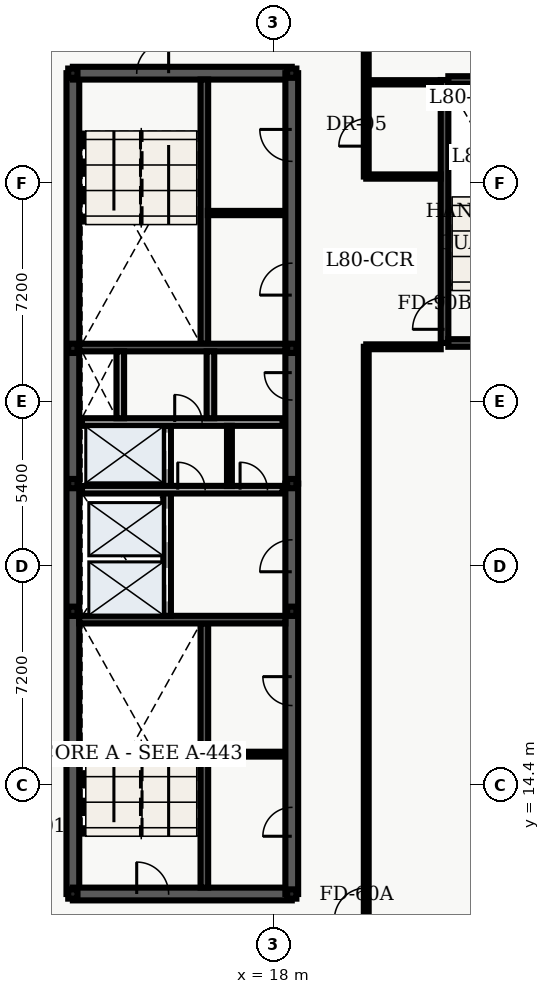
"""IFC4 building model, lengths in metres.
Left out: names, types, materials, properties, quantities, classifications, styles, units other than length and angle.
Written with IfcOpenShell. Run it as: python <this file> out.ifc"""

import sys

from ifc_helpers import new_model, entity, si_unit, converted_unit, direction, frame, origin_with_axes, origin_2d_with_axis, place, context, subcontext, project, spatial, polyline, rectangle, hollow_rectangle, outline, extrude, element, fill, save


model = new_model("IFC4")
c1 = context("Model", 3, precision=1e-05, world=origin_with_axes(), true_north=direction((0.0, 1.0)))
c2 = subcontext(c1, "Body", "Model", "MODEL_VIEW")
j1 = project(units=[si_unit("LENGTHUNIT", "METRE"), converted_unit("PLANEANGLEUNIT", "DEGREE", entity("IfcPlaneAngleMeasure", 0.017), si_unit("PLANEANGLEUNIT", "RADIAN"), dimensions=[0, 0, 0, 0, 0, 0, 0])], contexts=[c1])
p1 = place(None, origin_with_axes())
s1 = spatial("IfcSite", under=j1, at=p1, CompositionType="ELEMENT")
p2 = place(p1, origin_with_axes())
s2 = spatial("IfcBuilding", under=s1, at=p2, CompositionType="ELEMENT")
p3 = place(p2, frame((0.0, 0.0, 324.3), z_axis=(0.0, 0.0, 1.0), x_axis=(1.0, 0.0, 0.0)))
s3 = spatial("IfcBuildingStorey", under=s2, at=p3, CompositionType="ELEMENT", Elevation=324.3)
p4 = place(p3, frame((11.4, 10.8, 0.0), z_axis=(0.0, 0.0, 1.0), x_axis=(0.0, 1.0, 0.0)))
e1 = element("IfcWall", 1, at=p4, inside=s3, PredefinedType="SHEAR", context=c2, shape_type="SweptSolid", body=[
    extrude(outline(polyline([(0.0, -0.21), (27.0, -0.21), (27.0, 0.21), (0.0, 0.21), (0.0, -0.21)])), origin_with_axes(), (0.0, 0.0, 1.0), 3.64),
])
p5 = place(p3, frame((11.4, 10.8, 0.0), z_axis=(0.0, 0.0, 1.0), x_axis=(1.0, 0.0, 0.0)))
e2 = element("IfcWall", 2, at=p5, inside=s3, PredefinedType="SHEAR", context=c2, shape_type="SweptSolid", body=[
    extrude(outline(polyline([(0.0, -0.21), (7.2, -0.21), (7.2, 0.21), (0.0, 0.21), (0.0, -0.21)])), origin_with_axes(), (0.0, 0.0, 1.0), 3.64),
])
p6 = place(p5, frame((2.625, 0.0, 0.0), z_axis=(0.0, 0.0, 1.0), x_axis=(1.0, 0.0, 0.0)))
e3 = element("IfcOpeningElement", 3, at=p6, cuts=e2, PredefinedType="OPENING", context=c2, shape_type="SweptSolid", body=[
    extrude(rectangle(XDim=1.05, YDim=0.44, at=origin_2d_with_axis()), origin_with_axes(), (0.0, 0.0, 1.0), 2.15),
])
p7 = place(p3, frame((11.4, 37.8, 0.0), z_axis=(0.0, 0.0, 1.0), x_axis=(1.0, 0.0, 0.0)))
e4 = element("IfcWall", 4, at=p7, inside=s3, PredefinedType="SHEAR", context=c2, shape_type="SweptSolid", body=[
    extrude(outline(polyline([(0.0, -0.21), (7.2, -0.21), (7.2, 0.21), (0.0, 0.21), (0.0, -0.21)])), origin_with_axes(), (0.0, 0.0, 1.0), 3.64),
])
p8 = place(p7, frame((2.625, 0.0, 0.0), z_axis=(0.0, 0.0, 1.0), x_axis=(1.0, 0.0, 0.0)))
e5 = element("IfcOpeningElement", 5, at=p8, cuts=e4, PredefinedType="OPENING", context=c2, shape_type="SweptSolid", body=[
    extrude(rectangle(XDim=1.05, YDim=0.44, at=origin_2d_with_axis()), origin_with_axes(), (0.0, 0.0, 1.0), 2.15),
])
p9 = place(p3, frame((18.6, 10.8, 0.0), z_axis=(0.0, 0.0, 1.0), x_axis=(0.0, 1.0, 0.0)))
e6 = element("IfcWall", 6, at=p9, inside=s3, PredefinedType="SHEAR", context=c2, shape_type="SweptSolid", body=[
    extrude(outline(polyline([(0.0, -0.21), (13.5, -0.21), (13.5, 0.21), (0.0, 0.21), (0.0, -0.21)])), origin_with_axes(), (0.0, 0.0, 1.0), 3.64),
])
p10 = place(p9, frame((11.125, 0.0, 0.0), z_axis=(0.0, 0.0, 1.0), x_axis=(1.0, 0.0, 0.0)))
e7 = element("IfcOpeningElement", 7, at=p10, cuts=e6, PredefinedType="OPENING", context=c2, shape_type="SweptSolid", body=[
    extrude(rectangle(XDim=1.05, YDim=0.44, at=origin_2d_with_axis()), origin_with_axes(), (0.0, 0.0, 1.0), 2.15),
])
p11 = place(p9, frame((2.375, 0.0, 0.0), z_axis=(0.0, 0.0, 1.0), x_axis=(1.0, 0.0, 0.0)))
e8 = element("IfcOpeningElement", 8, at=p11, cuts=e6, PredefinedType="OPENING", context=c2, shape_type="SweptSolid", body=[
    extrude(rectangle(XDim=0.95, YDim=0.44, at=origin_2d_with_axis()), origin_with_axes(), (0.0, 0.0, 1.0), 2.15),
])
p12 = place(p9, frame((6.675, 0.0, 0.0), z_axis=(0.0, 0.0, 1.0), x_axis=(1.0, 0.0, 0.0)))
e9 = element("IfcOpeningElement", 9, at=p12, cuts=e6, PredefinedType="OPENING", context=c2, shape_type="SweptSolid", body=[
    extrude(rectangle(XDim=0.95, YDim=0.44, at=origin_2d_with_axis()), origin_with_axes(), (0.0, 0.0, 1.0), 2.15),
])
p13 = place(p3, frame((18.6, 24.3, 0.0), z_axis=(0.0, 0.0, 1.0), x_axis=(0.0, 1.0, 0.0)))
e10 = element("IfcWall", 10, at=p13, inside=s3, PredefinedType="SHEAR", context=c2, shape_type="SweptSolid", body=[
    extrude(outline(polyline([(0.0, -0.21), (13.5, -0.21), (13.5, 0.21), (0.0, 0.21), (0.0, -0.21)])), origin_with_axes(), (0.0, 0.0, 1.0), 3.64),
])
p14 = place(p13, frame((3.2, 0.0, 0.0), z_axis=(0.0, 0.0, 1.0), x_axis=(1.0, 0.0, 0.0)))
e11 = element("IfcOpeningElement", 11, at=p14, cuts=e10, PredefinedType="OPENING", context=c2, shape_type="SweptSolid", body=[
    extrude(rectangle(XDim=0.9, YDim=0.44, at=origin_2d_with_axis()), origin_with_axes(), (0.0, 0.0, 1.0), 2.15),
])
p15 = place(p13, frame((6.725, 0.0, 0.0), z_axis=(0.0, 0.0, 1.0), x_axis=(1.0, 0.0, 0.0)))
e12 = element("IfcOpeningElement", 12, at=p15, cuts=e10, PredefinedType="OPENING", context=c2, shape_type="SweptSolid", body=[
    extrude(rectangle(XDim=1.05, YDim=0.44, at=origin_2d_with_axis()), origin_with_axes(), (0.0, 0.0, 1.0), 2.15),
])
p16 = place(p13, frame((11.125, 0.0, 0.0), z_axis=(0.0, 0.0, 1.0), x_axis=(1.0, 0.0, 0.0)))
e13 = element("IfcOpeningElement", 13, at=p16, cuts=e10, PredefinedType="OPENING", context=c2, shape_type="SweptSolid", body=[
    extrude(rectangle(XDim=1.05, YDim=0.44, at=origin_2d_with_axis()), origin_with_axes(), (0.0, 0.0, 1.0), 2.15),
])
p17 = place(p3, frame((15.725, 11.01, 0.0), z_axis=(0.0, 0.0, 1.0), x_axis=(0.0, 1.0, 0.0)))
e14 = element("IfcWall", 14, at=p17, inside=s3, PredefinedType="SHEAR", context=c2, shape_type="SweptSolid", body=[
    extrude(outline(polyline([(0.0, -0.125), (8.69, -0.125), (8.69, 0.125), (0.0, 0.125), (0.0, -0.125)])), origin_with_axes(), (0.0, 0.0, 1.0), 3.64),
])
p18 = place(p3, frame((11.61, 19.825, 0.0), z_axis=(0.0, 0.0, 1.0), x_axis=(1.0, 0.0, 0.0)))
e15 = element("IfcWall", 15, at=p18, inside=s3, PredefinedType="SHEAR", context=c2, shape_type="SweptSolid", body=[
    extrude(outline(polyline([(0.0, -0.125), (6.78, -0.125), (6.78, 0.125), (0.0, 0.125), (0.0, -0.125)])), origin_with_axes(), (0.0, 0.0, 1.0), 3.64),
])
p19 = place(p3, frame((15.725, 28.9, 0.0), z_axis=(0.0, 0.0, 1.0), x_axis=(0.0, 1.0, 0.0)))
e16 = element("IfcWall", 16, at=p19, inside=s3, PredefinedType="SHEAR", context=c2, shape_type="SweptSolid", body=[
    extrude(outline(polyline([(0.0, -0.125), (8.69, -0.125), (8.69, 0.125), (0.0, 0.125), (0.0, -0.125)])), origin_with_axes(), (0.0, 0.0, 1.0), 3.64),
])
p20 = place(p3, frame((11.61, 28.775, 0.0), z_axis=(0.0, 0.0, 1.0), x_axis=(1.0, 0.0, 0.0)))
e17 = element("IfcWall", 17, at=p20, inside=s3, PredefinedType="SHEAR", context=c2, shape_type="SweptSolid", body=[
    extrude(outline(polyline([(0.0, -0.125), (6.78, -0.125), (6.78, 0.125), (0.0, 0.125), (0.0, -0.125)])), origin_with_axes(), (0.0, 0.0, 1.0), 3.64),
])
p21 = place(p3, frame((14.5, 19.95, 0.0), z_axis=(0.0, 0.0, 1.0), x_axis=(0.0, 1.0, 0.0)))
e18 = element("IfcWall", 18, at=p21, inside=s3, PredefinedType="SOLIDWALL", context=c2, shape_type="SweptSolid", body=[
    extrude(outline(polyline([(0.0, -0.125), (6.25, -0.125), (6.25, 0.125), (0.0, 0.125), (0.0, -0.125)])), origin_with_axes(), (0.0, 0.0, 1.0), 2.68),
])
p22 = place(p21, frame((1.025, 0.0, 0.0), z_axis=(0.0, 0.0, 1.0), x_axis=(1.0, 0.0, 0.0)))
e19 = element("IfcOpeningElement", 19, at=p22, cuts=e18, PredefinedType="OPENING", context=c2, shape_type="SweptSolid", body=[
    extrude(rectangle(XDim=1.1, YDim=0.27, at=origin_2d_with_axis()), origin_with_axes(), (0.0, 0.0, 1.0), 2.15),
])
p23 = place(p21, frame((2.975, 0.0, 0.0), z_axis=(0.0, 0.0, 1.0), x_axis=(1.0, 0.0, 0.0)))
e20 = element("IfcOpeningElement", 20, at=p23, cuts=e18, PredefinedType="OPENING", context=c2, shape_type="SweptSolid", body=[
    extrude(rectangle(XDim=1.1, YDim=0.27, at=origin_2d_with_axis()), origin_with_axes(), (0.0, 0.0, 1.0), 2.15),
])
p24 = place(p21, frame((5.425, 0.0, 0.0), z_axis=(0.0, 0.0, 1.0), x_axis=(1.0, 0.0, 0.0)))
e21 = element("IfcOpeningElement", 21, at=p24, cuts=e18, PredefinedType="OPENING", context=c2, shape_type="SweptSolid", body=[
    extrude(rectangle(XDim=1.2, YDim=0.27, at=origin_2d_with_axis()), origin_with_axes(), (0.0, 0.0, 1.0), 2.15),
])
p25 = place(p3, frame((11.7, 24.1, 0.0), z_axis=(0.0, 0.0, 1.0), x_axis=(1.0, 0.0, 0.0)))
e22 = element("IfcWall", 22, at=p25, inside=s3, PredefinedType="SOLIDWALL", context=c2, shape_type="SweptSolid", body=[
    extrude(outline(polyline([(0.0, -0.125), (6.6, -0.125), (6.6, 0.125), (0.0, 0.125), (0.0, -0.125)])), origin_with_axes(), (0.0, 0.0, 1.0), 2.68),
])
p26 = place(p25, frame((3.6, 0.0, 0.0), z_axis=(0.0, 0.0, 1.0), x_axis=(1.0, 0.0, 0.0)))
e23 = element("IfcOpeningElement", 23, at=p26, cuts=e22, PredefinedType="OPENING", context=c2, shape_type="SweptSolid", body=[
    extrude(rectangle(XDim=0.9, YDim=0.27, at=origin_2d_with_axis()), origin_with_axes(), (0.0, 0.0, 1.0), 2.15),
])
p27 = place(p25, frame((5.65, 0.0, 0.0), z_axis=(0.0, 0.0, 1.0), x_axis=(1.0, 0.0, 0.0)))
e24 = element("IfcOpeningElement", 24, at=p27, cuts=e22, PredefinedType="OPENING", context=c2, shape_type="SweptSolid", body=[
    extrude(rectangle(XDim=0.9, YDim=0.27, at=origin_2d_with_axis()), origin_with_axes(), (0.0, 0.0, 1.0), 2.15),
])
p28 = place(p3, frame((11.7, 26.325, 0.0), z_axis=(0.0, 0.0, 1.0), x_axis=(1.0, 0.0, 0.0)))
e25 = element("IfcWall", 25, at=p28, inside=s3, PredefinedType="SOLIDWALL", context=c2, shape_type="SweptSolid", body=[
    extrude(outline(polyline([(0.0, -0.125), (6.6, -0.125), (6.6, 0.125), (0.0, 0.125), (0.0, -0.125)])), origin_with_axes(), (0.0, 0.0, 1.0), 2.68),
])
p29 = place(p28, frame((3.5, 0.0, 0.0), z_axis=(0.0, 0.0, 1.0), x_axis=(1.0, 0.0, 0.0)))
e26 = element("IfcOpeningElement", 26, at=p29, cuts=e25, PredefinedType="OPENING", context=c2, shape_type="SweptSolid", body=[
    extrude(rectangle(XDim=0.9, YDim=0.27, at=origin_2d_with_axis()), origin_with_axes(), (0.0, 0.0, 1.0), 2.15),
])
for number, where, z_axis, x_axis in (
    (27, (12.96, 26.45, 0.0), (0.0, 0.0, 1.0), (0.0, 1.0, 0.0)),
    (28, (15.925, 26.45, 0.0), (0.0, 0.0, 1.0), (0.0, 1.0, 0.0)),
):
    element("IfcWall", number, at=place(p3, frame(where, z_axis=z_axis, x_axis=x_axis)), inside=s3, PredefinedType="SOLIDWALL", context=c2, shape_type="SweptSolid", body=[
        extrude(outline(polyline([(0.0, -0.125), (2.2, -0.125), (2.2, 0.125), (0.0, 0.125), (0.0, -0.125)])), origin_with_axes(), (0.0, 0.0, 1.0), 2.68),
    ])
p30 = place(p3, frame((23.625, 28.925, 0.0), z_axis=(0.0, 0.0, 1.0), x_axis=(0.0, 1.0, 0.0)))
e29 = element("IfcWall", 29, at=p30, inside=s3, PredefinedType="SHEAR", context=c2, shape_type="SweptSolid", body=[
    extrude(outline(polyline([(0.0, -0.125), (8.65, -0.125), (8.65, 0.125), (0.0, 0.125), (0.0, -0.125)])), origin_with_axes(), (0.0, 0.0, 1.0), 3.64),
])
p31 = place(p30, frame((0.975, 0.0, 0.0), z_axis=(0.0, 0.0, 1.0), x_axis=(1.0, 0.0, 0.0)))
e30 = element("IfcOpeningElement", 30, at=p31, cuts=e29, PredefinedType="OPENING", context=c2, shape_type="SweptSolid", body=[
    extrude(rectangle(XDim=1.05, YDim=0.27, at=origin_2d_with_axis()), origin_with_axes(), (0.0, 0.0, 1.0), 2.15),
])
for number, where, z_axis, x_axis in (
    (31, (23.75, 28.925, 0.0), (0.0, 0.0, 1.0), (1.0, 0.0, 0.0)),
    (32, (23.75, 37.575, 0.0), (0.0, 0.0, 1.0), (1.0, 0.0, 0.0)),
):
    element("IfcWall", number, at=place(p3, frame(where, z_axis=z_axis, x_axis=x_axis)), inside=s3, PredefinedType="SHEAR", context=c2, shape_type="SweptSolid", body=[
        extrude(outline(polyline([(0.0, -0.125), (3.9, -0.125), (3.9, 0.125), (0.0, 0.125), (0.0, -0.125)])), origin_with_axes(), (0.0, 0.0, 1.0), 3.64),
    ])
for number, where, z_axis, x_axis in (
    (33, (11.4, 10.8, 0.0), (0.0, 0.0, 1.0), (1.0, 0.0, 0.0)),
    (34, (11.4, 20.1, 0.0), (0.0, 0.0, 1.0), (1.0, 0.0, 0.0)),
    (35, (11.4, 24.3, 0.0), (0.0, 0.0, 1.0), (1.0, 0.0, 0.0)),
    (36, (11.4, 28.75, 0.0), (0.0, 0.0, 1.0), (1.0, 0.0, 0.0)),
    (37, (11.4, 37.8, 0.0), (0.0, 0.0, 1.0), (1.0, 0.0, 0.0)),
    (38, (18.6, 10.8, 0.0), (0.0, 0.0, 1.0), (1.0, 0.0, 0.0)),
    (39, (18.6, 20.1, 0.0), (0.0, 0.0, 1.0), (1.0, 0.0, 0.0)),
    (40, (18.6, 24.3, 0.0), (0.0, 0.0, 1.0), (1.0, 0.0, 0.0)),
    (41, (18.6, 28.75, 0.0), (0.0, 0.0, 1.0), (1.0, 0.0, 0.0)),
    (42, (18.6, 37.8, 0.0), (0.0, 0.0, 1.0), (1.0, 0.0, 0.0)),
):
    element("IfcColumn", number, at=place(p3, frame(where, z_axis=z_axis, x_axis=x_axis)), inside=s3, PredefinedType="COLUMN", context=c2, shape_type="SweptSolid", body=[
        extrude(hollow_rectangle(XDim=0.305, YDim=0.305, WallThickness=0.015, InnerFilletRadius=0.015, OuterFilletRadius=0.03, at=origin_2d_with_axis()), origin_with_axes(), (0.0, 0.0, 1.0), 3.9),
    ])
p32 = place(p3, frame((16.55, 24.22, 0.0), z_axis=(0.0, 0.0, 1.0), x_axis=(0.0, 1.0, 0.0)))
e43 = element("IfcWall", 43, at=p32, inside=s3, PredefinedType="PARTITIONING", context=c2, shape_type="SweptSolid", body=[
    extrude(outline(polyline([(0.0, -0.08), (1.98, -0.08), (1.98, 0.08), (0.0, 0.08), (0.0, -0.08)])), origin_with_axes(), (0.0, 0.0, 1.0), 2.68),
])
p33 = place(p3, frame((15.84, 15.4, 0.0), z_axis=(0.0, 0.0, 1.0), x_axis=(1.0, 0.0, 0.0)))
e44 = element("IfcWall", 44, at=p33, inside=s3, PredefinedType="PARTITIONING", context=c2, shape_type="SweptSolid", body=[
    extrude(outline(polyline([(0.0, -0.08), (2.46, -0.08), (2.46, 0.08), (0.0, 0.08), (0.0, -0.08)])), origin_with_axes(), (0.0, 0.0, 1.0), 2.68),
])
p34 = place(p3, frame((15.84, 33.2, 0.0), z_axis=(0.0, 0.0, 1.0), x_axis=(1.0, 0.0, 0.0)))
e45 = element("IfcWall", 45, at=p34, inside=s3, PredefinedType="PARTITIONING", context=c2, shape_type="SweptSolid", body=[
    extrude(outline(polyline([(0.0, -0.07), (2.46, -0.07), (2.46, 0.07), (0.0, 0.07), (0.0, -0.07)])), origin_with_axes(), (0.0, 0.0, 1.0), 2.68),
])
for number, where, z_axis, x_axis in (
    (46, (21.05, 34.4, 0.0), (0.0, 0.0, 1.0), (1.0, 0.0, 0.0)),
    (47, (21.05, 37.5, 0.0), (0.0, 0.0, 1.0), (1.0, 0.0, 0.0)),
):
    element("IfcWall", number, at=place(p3, frame(where, z_axis=z_axis, x_axis=x_axis)), inside=s3, PredefinedType="PARTITIONING", context=c2, shape_type="SweptSolid", body=[
        extrude(outline(polyline([(0.0, -0.07), (2.45, -0.07), (2.45, 0.07), (0.0, 0.07), (0.0, -0.07)])), origin_with_axes(), (0.0, 0.0, 1.0), 2.68),
    ])
p35 = place(p3, frame((21.05, 5.695, 0.0), z_axis=(0.0, 0.0, 1.0), x_axis=(0.0, 1.0, 0.0)))
e48 = element("IfcWall", 48, at=p35, inside=s3, PredefinedType="PARTITIONING", context=c2, shape_type="SweptSolid", body=[
    extrude(outline(polyline([(0.0, -0.08), (23.105, -0.08), (23.105, 0.08), (0.0, 0.08), (0.0, -0.08)])), origin_with_axes(), (0.0, 0.0, 1.0), 2.68),
])
p36 = place(p35, frame((4.78, 0.0, 0.0), z_axis=(0.0, 0.0, 1.0), x_axis=(1.0, 0.0, 0.0)))
e49 = element("IfcOpeningElement", 49, at=p36, cuts=e48, PredefinedType="OPENING", context=c2, shape_type="SweptSolid", body=[
    extrude(rectangle(XDim=1.05, YDim=0.18, at=origin_2d_with_axis()), origin_with_axes(), (0.0, 0.0, 1.0), 2.15),
])
p37 = place(p3, frame((21.05, 34.4, 0.0), z_axis=(0.0, 0.0, 1.0), x_axis=(0.0, 1.0, 0.0)))
e50 = element("IfcWall", 50, at=p37, inside=s3, PredefinedType="PARTITIONING", context=c2, shape_type="SweptSolid", body=[
    extrude(outline(polyline([(0.0, -0.08), (5.2, -0.08), (5.2, 0.08), (0.0, 0.08), (0.0, -0.08)])), origin_with_axes(), (0.0, 0.0, 1.0), 2.68),
])
p38 = place(p37, frame((1.45, 0.0, 0.0), z_axis=(0.0, 0.0, 1.0), x_axis=(1.0, 0.0, 0.0)))
e51 = element("IfcOpeningElement", 51, at=p38, cuts=e50, PredefinedType="OPENING", context=c2, shape_type="SweptSolid", body=[
    extrude(rectangle(XDim=0.9, YDim=0.18, at=origin_2d_with_axis()), origin_with_axes(), (0.0, 0.0, 1.0), 2.15),
])
p39 = place(p3, frame((21.05, 28.8, 0.0), z_axis=(0.0, 0.0, 1.0), x_axis=(1.0, 0.0, 0.0)))
e52 = element("IfcWall", 52, at=p39, inside=s3, PredefinedType="PARTITIONING", context=c2, shape_type="SweptSolid", body=[
    extrude(outline(polyline([(0.0, -0.08), (2.45, -0.08), (2.45, 0.08), (0.0, 0.08), (0.0, -0.08)])), origin_with_axes(), (0.0, 0.0, 1.0), 2.68),
])
p40 = place(p21, frame((1.025, 0.0, 0.0), z_axis=(0.0, 0.0, 1.0), x_axis=(1.0, 0.0, 0.0)))
e53 = element("IfcDoor", 53, at=p40, inside=s3, OperationType="SLIDING_TO_LEFT", PredefinedType="DOOR", context=c2, shape_type="SweptSolid", body=[
    extrude(rectangle(XDim=1.1, YDim=0.09, at=origin_2d_with_axis()), origin_with_axes(), (0.0, 0.0, 1.0), 2.15),
])
fill(e19, e53)
p41 = place(p21, frame((2.975, 0.0, 0.0), z_axis=(0.0, 0.0, 1.0), x_axis=(1.0, 0.0, 0.0)))
e54 = element("IfcDoor", 54, at=p41, inside=s3, OperationType="SLIDING_TO_RIGHT", PredefinedType="DOOR", context=c2, shape_type="SweptSolid", body=[
    extrude(rectangle(XDim=1.1, YDim=0.09, at=origin_2d_with_axis()), origin_with_axes(), (0.0, 0.0, 1.0), 2.15),
])
fill(e20, e54)
p42 = place(p21, frame((5.425, 0.0, 0.0), z_axis=(0.0, 0.0, 1.0), x_axis=(1.0, 0.0, 0.0)))
e55 = element("IfcDoor", 55, at=p42, inside=s3, OperationType="DOUBLE_DOOR_SLIDING", PredefinedType="DOOR", context=c2, shape_type="SweptSolid", body=[
    extrude(rectangle(XDim=1.2, YDim=0.09, at=origin_2d_with_axis()), origin_with_axes(), (0.0, 0.0, 1.0), 2.15),
])
fill(e21, e55)
p43 = place(p13, frame((3.2, 0.0, 0.0), z_axis=(0.0, 0.0, 1.0), x_axis=(1.0, 0.0, 0.0)))
e56 = element("IfcDoor", 56, at=p43, inside=s3, OperationType="SINGLE_SWING_RIGHT", PredefinedType="DOOR", context=c2, shape_type="SweptSolid", body=[
    extrude(rectangle(XDim=0.9, YDim=0.09, at=origin_2d_with_axis()), origin_with_axes(), (0.0, 0.0, 1.0), 2.15),
])
fill(e11, e56)
p44 = place(p5, frame((2.625, 0.0, 0.0), z_axis=(0.0, 0.0, 1.0), x_axis=(1.0, 0.0, 0.0)))
e57 = element("IfcDoor", 57, at=p44, inside=s3, OperationType="SINGLE_SWING_LEFT", PredefinedType="DOOR", context=c2, shape_type="SweptSolid", body=[
    extrude(rectangle(XDim=1.05, YDim=0.09, at=origin_2d_with_axis()), origin_with_axes(), (0.0, 0.0, 1.0), 2.15),
])
fill(e3, e57)
p45 = place(p7, frame((2.625, 0.0, 0.0), z_axis=(0.0, 0.0, 1.0), x_axis=(1.0, 0.0, 0.0)))
e58 = element("IfcDoor", 58, at=p45, inside=s3, OperationType="SINGLE_SWING_RIGHT", PredefinedType="DOOR", context=c2, shape_type="SweptSolid", body=[
    extrude(rectangle(XDim=1.05, YDim=0.09, at=origin_2d_with_axis()), origin_with_axes(), (0.0, 0.0, 1.0), 2.15),
])
fill(e5, e58)
p46 = place(p9, frame((11.125, 0.0, 0.0), z_axis=(0.0, 0.0, 1.0), x_axis=(1.0, 0.0, 0.0)))
e59 = element("IfcDoor", 59, at=p46, inside=s3, OperationType="SINGLE_SWING_LEFT", PredefinedType="DOOR", context=c2, shape_type="SweptSolid", body=[
    extrude(rectangle(XDim=1.05, YDim=0.09, at=origin_2d_with_axis()), origin_with_axes(), (0.0, 0.0, 1.0), 2.15),
])
fill(e7, e59)
p47 = place(p25, frame((3.6, 0.0, 0.0), z_axis=(0.0, 0.0, 1.0), x_axis=(1.0, 0.0, 0.0)))
e60 = element("IfcDoor", 60, at=p47, inside=s3, OperationType="SINGLE_SWING_LEFT", PredefinedType="DOOR", context=c2, shape_type="SweptSolid", body=[
    extrude(rectangle(XDim=0.9, YDim=0.09, at=origin_2d_with_axis()), origin_with_axes(), (0.0, 0.0, 1.0), 2.15),
])
fill(e23, e60)
p48 = place(p25, frame((5.65, 0.0, 0.0), z_axis=(0.0, 0.0, 1.0), x_axis=(1.0, 0.0, 0.0)))
e61 = element("IfcDoor", 61, at=p48, inside=s3, OperationType="SINGLE_SWING_LEFT", PredefinedType="DOOR", context=c2, shape_type="SweptSolid", body=[
    extrude(rectangle(XDim=0.9, YDim=0.09, at=origin_2d_with_axis()), origin_with_axes(), (0.0, 0.0, 1.0), 2.15),
])
fill(e24, e61)
p49 = place(p28, frame((3.5, 0.0, 0.0), z_axis=(0.0, 0.0, 1.0), x_axis=(1.0, 0.0, 0.0)))
e62 = element("IfcDoor", 62, at=p49, inside=s3, OperationType="SINGLE_SWING_LEFT", PredefinedType="DOOR", context=c2, shape_type="SweptSolid", body=[
    extrude(rectangle(XDim=0.9, YDim=0.09, at=origin_2d_with_axis()), origin_with_axes(), (0.0, 0.0, 1.0), 2.15),
])
fill(e26, e62)
p50 = place(p9, frame((2.375, 0.0, 0.0), z_axis=(0.0, 0.0, 1.0), x_axis=(1.0, 0.0, 0.0)))
e63 = element("IfcDoor", 63, at=p50, inside=s3, OperationType="SINGLE_SWING_LEFT", PredefinedType="DOOR", context=c2, shape_type="SweptSolid", body=[
    extrude(rectangle(XDim=0.95, YDim=0.09, at=origin_2d_with_axis()), origin_with_axes(), (0.0, 0.0, 1.0), 2.15),
])
fill(e8, e63)
p51 = place(p9, frame((6.675, 0.0, 0.0), z_axis=(0.0, 0.0, 1.0), x_axis=(1.0, 0.0, 0.0)))
e64 = element("IfcDoor", 64, at=p51, inside=s3, OperationType="SINGLE_SWING_RIGHT", PredefinedType="DOOR", context=c2, shape_type="SweptSolid", body=[
    extrude(rectangle(XDim=0.95, YDim=0.09, at=origin_2d_with_axis()), origin_with_axes(), (0.0, 0.0, 1.0), 2.15),
])
fill(e9, e64)
p52 = place(p13, frame((6.725, 0.0, 0.0), z_axis=(0.0, 0.0, 1.0), x_axis=(1.0, 0.0, 0.0)))
e65 = element("IfcDoor", 65, at=p52, inside=s3, OperationType="SINGLE_SWING_LEFT", PredefinedType="DOOR", context=c2, shape_type="SweptSolid", body=[
    extrude(rectangle(XDim=1.05, YDim=0.09, at=origin_2d_with_axis()), origin_with_axes(), (0.0, 0.0, 1.0), 2.15),
])
fill(e12, e65)
p53 = place(p13, frame((11.125, 0.0, 0.0), z_axis=(0.0, 0.0, 1.0), x_axis=(1.0, 0.0, 0.0)))
e66 = element("IfcDoor", 66, at=p53, inside=s3, OperationType="SINGLE_SWING_RIGHT", PredefinedType="DOOR", context=c2, shape_type="SweptSolid", body=[
    extrude(rectangle(XDim=1.05, YDim=0.09, at=origin_2d_with_axis()), origin_with_axes(), (0.0, 0.0, 1.0), 2.15),
])
fill(e13, e66)
p54 = place(p30, frame((0.975, 0.0, 0.0), z_axis=(0.0, 0.0, 1.0), x_axis=(1.0, 0.0, 0.0)))
e67 = element("IfcDoor", 67, at=p54, inside=s3, OperationType="SINGLE_SWING_LEFT", PredefinedType="DOOR", context=c2, shape_type="SweptSolid", body=[
    extrude(rectangle(XDim=1.05, YDim=0.09, at=origin_2d_with_axis()), origin_with_axes(), (0.0, 0.0, 1.0), 2.15),
])
fill(e30, e67)
p55 = place(p37, frame((1.45, 0.0, 0.0), z_axis=(0.0, 0.0, 1.0), x_axis=(1.0, 0.0, 0.0)))
e68 = element("IfcDoor", 68, at=p55, inside=s3, OperationType="SINGLE_SWING_LEFT", PredefinedType="DOOR", context=c2, shape_type="SweptSolid", body=[
    extrude(rectangle(XDim=0.9, YDim=0.09, at=origin_2d_with_axis()), origin_with_axes(), (0.0, 0.0, 1.0), 2.15),
])
fill(e51, e68)
p56 = place(p35, frame((4.78, 0.0, 0.0), z_axis=(0.0, 0.0, 1.0), x_axis=(1.0, 0.0, 0.0)))
e69 = element("IfcDoor", 69, at=p56, inside=s3, OperationType="SINGLE_SWING_LEFT", PredefinedType="DOOR", context=c2, shape_type="SweptSolid", body=[
    extrude(rectangle(XDim=1.05, YDim=0.09, at=origin_2d_with_axis()), origin_with_axes(), (0.0, 0.0, 1.0), 2.15),
])
fill(e49, e69)
save(model, sys.argv[1])
